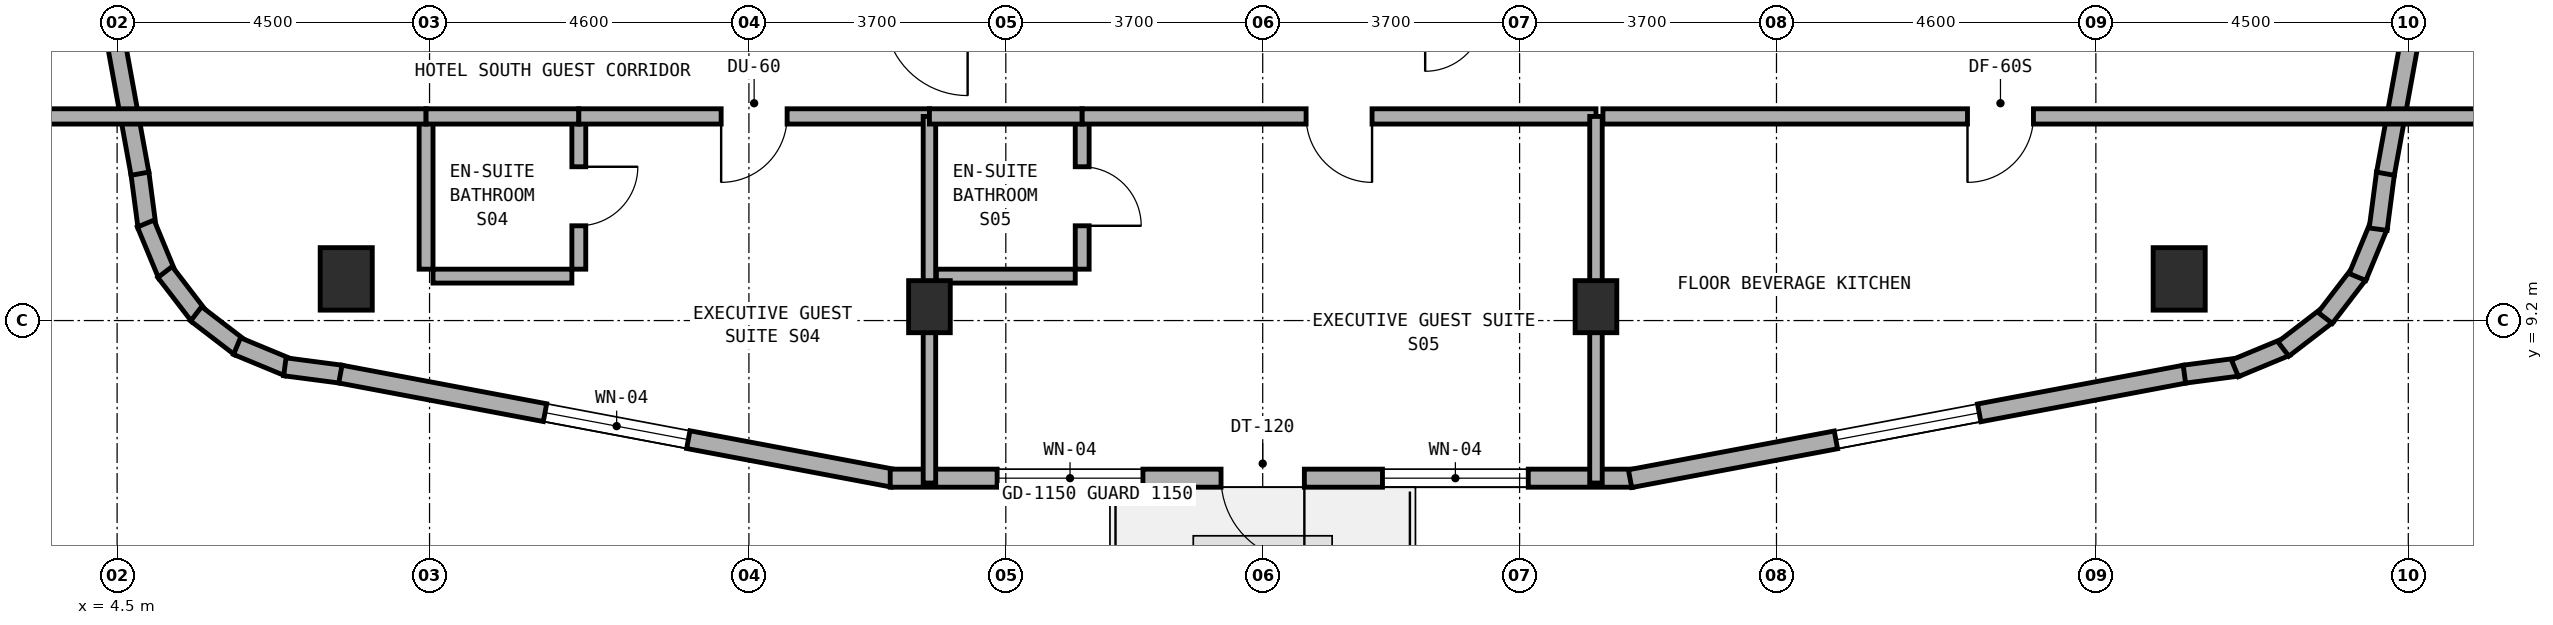
"""IFC4 building model, lengths in metres.
Left out: names, types, materials, properties, quantities, classifications, styles, units other than length and angle.
Written with IfcOpenShell. Run it as: python <this file> out.ifc"""

import sys

from ifc_helpers import new_model, si_unit, direction, frame, frame_2d, origin, origin_2d, place, context, subcontext, project, spatial, rectangle, extrude, element, fill, save


model = new_model("IFC4")
c1 = context("Model", 3, precision=1e-05, world=origin(), true_north=direction((0.0, 1.0)))
c2 = subcontext(c1, "Body", "Model", "MODEL_VIEW")
j1 = project(units=[si_unit("LENGTHUNIT", "METRE"), si_unit("PLANEANGLEUNIT", "RADIAN")], contexts=[c1])
p1 = place(None, origin())
s1 = spatial("IfcSite", under=j1, at=p1, CompositionType="ELEMENT")
p2 = place(p1, origin())
s2 = spatial("IfcBuilding", under=s1, at=p2, CompositionType="ELEMENT")
p3 = place(p2, frame((0.0, 0.0, 254.0)))
s3 = spatial("IfcBuildingStorey", under=s2, at=p3, CompositionType="ELEMENT", Elevation=254.0)
for number, where, z_axis, x_axis in (
    (1, (16.2, 9.4, 0.0), (0.0, 0.0, 1.0), (1.0, 0.0, 0.0)),
    (2, (25.8, 9.4, 0.0), (0.0, 0.0, 1.0), (1.0, 0.0, 0.0)),
):
    element("IfcColumn", number, at=place(p3, frame(where, z_axis=z_axis, x_axis=x_axis)), inside=s3, PredefinedType="COLUMN", context=c2, shape_type="SweptSolid", body=[
        extrude(rectangle(XDim=0.6, YDim=0.75, at=origin_2d()), origin(), (0.0, 0.0, 1.0), 3.6),
    ])
for number, where, z_axis, x_axis in (
    (3, (7.8, 9.8, 0.0), (0.0, 0.0, 1.0), (1.0, 0.0, 0.0)),
    (4, (34.2, 9.8, 0.0), (0.0, 0.0, 1.0), (1.0, 0.0, 0.0)),
):
    element("IfcColumn", number, at=place(p3, frame(where, z_axis=z_axis, x_axis=x_axis)), inside=s3, PredefinedType="COLUMN", context=c2, shape_type="SweptSolid", body=[
        extrude(rectangle(XDim=0.75, YDim=0.9, at=origin_2d()), origin(), (0.0, 0.0, 1.0), 3.6),
    ])
p4 = place(p3, frame((4.828, 11.325, 0.0), z_axis=(0.0, 0.0, 1.0), x_axis=(0.130729574419, -0.991418064377, 0.0)))
e5 = element("IfcWall", 5, at=p4, inside=s3, PredefinedType="STANDARD", context=c2, shape_type="SweptSolid", body=[
    extrude(rectangle(XDim=0.781, YDim=0.26, at=frame_2d((0.39, 0.0))), origin(), (0.0, 0.0, 1.0), 3.32),
])
p5 = place(p3, frame((4.912, 10.597, 0.0), z_axis=(0.0, 0.0, 1.0), x_axis=(0.382900540965, -0.923789573295, 0.0)))
e6 = element("IfcWall", 6, at=p5, inside=s3, PredefinedType="STANDARD", context=c2, shape_type="SweptSolid", body=[
    extrude(rectangle(XDim=0.799, YDim=0.26, at=frame_2d((0.399, 0.0))), origin(), (0.0, 0.0, 1.0), 3.32),
])
p6 = place(p3, frame((5.19, 9.899, 0.0), z_axis=(0.0, 0.0, 1.0), x_axis=(0.60916352983, -0.793044635519, 0.0)))
e7 = element("IfcWall", 7, at=p6, inside=s3, PredefinedType="STANDARD", context=c2, shape_type="SweptSolid", body=[
    extrude(rectangle(XDim=0.798, YDim=0.26, at=frame_2d((0.399, 0.0))), origin(), (0.0, 0.0, 1.0), 3.32),
])
p7 = place(p3, frame((5.638, 9.297, 0.0), z_axis=(0.0, 0.0, 1.0), x_axis=(0.793158129381, -0.609015748398, 0.0)))
e8 = element("IfcWall", 8, at=p7, inside=s3, PredefinedType="STANDARD", context=c2, shape_type="SweptSolid", body=[
    extrude(rectangle(XDim=0.798, YDim=0.26, at=frame_2d((0.399, 0.0))), origin(), (0.0, 0.0, 1.0), 3.32),
])
p8 = place(p3, frame((6.227, 8.832, 0.0), z_axis=(0.0, 0.0, 1.0), x_axis=(0.923681457047, -0.383161279238, 0.0)))
e9 = element("IfcWall", 9, at=p8, inside=s3, PredefinedType="STANDARD", context=c2, shape_type="SweptSolid", body=[
    extrude(rectangle(XDim=0.799, YDim=0.26, at=frame_2d((0.399, 0.0))), origin(), (0.0, 0.0, 1.0), 3.32),
])
p9 = place(p3, frame((6.916, 8.534, 0.0), z_axis=(0.0, 0.0, 1.0), x_axis=(0.99153354416, -0.129850802102, 0.0)))
e10 = element("IfcWall", 10, at=p9, inside=s3, PredefinedType="STANDARD", context=c2, shape_type="SweptSolid", body=[
    extrude(rectangle(XDim=0.816, YDim=0.26, at=frame_2d((0.408, 0.0))), origin(), (0.0, 0.0, 1.0), 3.32),
])
p10 = place(p3, frame((7.716, 8.429, 0.0), z_axis=(0.0, 0.0, 1.0), x_axis=(0.982717573718, -0.185111237656, 0.0)))
e11 = element("IfcWall", 11, at=p10, inside=s3, PredefinedType="STANDARD", context=c2, shape_type="SweptSolid", body=[
    extrude(rectangle(XDim=8.098, YDim=0.26, at=frame_2d((4.049, 0.0))), origin(), (0.0, 0.0, 1.0), 3.32),
])
p11 = place(p10, frame((2.999, 0.0, 0.85)))
e12 = element("IfcOpeningElement", 12, at=p11, cuts=e11, PredefinedType="OPENING", context=c2, shape_type="SweptSolid", body=[
    extrude(rectangle(XDim=2.1, YDim=1.5, at=frame_2d((1.05, 0.75))), frame((0.0, 0.14, 0.0), z_axis=(0.0, -1.0, 0.0), x_axis=(1.0, 0.0, 0.0)), (0.0, 0.0, 1.0), 0.28),
])
p12 = place(p3, frame((15.635, 6.93, 0.0), z_axis=(0.0, 0.0, 1.0), x_axis=(1.0, 0.0, 0.0)))
e13 = element("IfcWall", 13, at=p12, inside=s3, PredefinedType="STANDARD", context=c2, shape_type="SweptSolid", body=[
    extrude(rectangle(XDim=10.695, YDim=0.26, at=frame_2d((5.348, 0.0))), origin(), (0.0, 0.0, 1.0), 3.32),
])
p13 = place(p12, frame((4.765, 0.0, 0.0)))
e14 = element("IfcOpeningElement", 14, at=p13, cuts=e13, PredefinedType="OPENING", context=c2, shape_type="SweptSolid", body=[
    extrude(rectangle(XDim=1.2, YDim=2.15, at=frame_2d((0.6, 1.075))), frame((0.0, 0.14, 0.0), z_axis=(0.0, -1.0, 0.0), x_axis=(1.0, 0.0, 0.0)), (0.0, 0.0, 1.0), 0.28),
])
p14 = place(p12, frame((1.54, 0.0, 0.85)))
e15 = element("IfcOpeningElement", 15, at=p14, cuts=e13, PredefinedType="OPENING", context=c2, shape_type="SweptSolid", body=[
    extrude(rectangle(XDim=2.1, YDim=1.5, at=frame_2d((1.05, 0.75))), frame((0.0, 0.14, 0.0), z_axis=(0.0, -1.0, 0.0), x_axis=(1.0, 0.0, 0.0)), (0.0, 0.0, 1.0), 0.28),
])
p15 = place(p12, frame((7.09, 0.0, 0.85)))
e16 = element("IfcOpeningElement", 16, at=p15, cuts=e13, PredefinedType="OPENING", context=c2, shape_type="SweptSolid", body=[
    extrude(rectangle(XDim=2.1, YDim=1.5, at=frame_2d((1.05, 0.75))), frame((0.0, 0.14, 0.0), z_axis=(0.0, -1.0, 0.0), x_axis=(1.0, 0.0, 0.0)), (0.0, 0.0, 1.0), 0.28),
])
p16 = place(p3, frame((26.291, 6.923, 0.0), z_axis=(0.0, 0.0, 1.0), x_axis=(0.982711765767, 0.185142068214, 0.0)))
e17 = element("IfcWall", 17, at=p16, inside=s3, PredefinedType="STANDARD", context=c2, shape_type="SweptSolid", body=[
    extrude(rectangle(XDim=8.134, YDim=0.26, at=frame_2d((4.067, 0.0))), origin(), (0.0, 0.0, 1.0), 3.32),
])
p17 = place(p16, frame((3.017, 0.0, 0.85)))
e18 = element("IfcOpeningElement", 18, at=p17, cuts=e17, PredefinedType="OPENING", context=c2, shape_type="SweptSolid", body=[
    extrude(rectangle(XDim=2.1, YDim=1.5, at=frame_2d((1.05, 0.75))), frame((0.0, 0.14, 0.0), z_axis=(0.0, -1.0, 0.0), x_axis=(1.0, 0.0, 0.0)), (0.0, 0.0, 1.0), 0.28),
])
p18 = place(p3, frame((34.275, 8.428, 0.0), z_axis=(0.0, 0.0, 1.0), x_axis=(0.991423406861, 0.130689052056, 0.0)))
e19 = element("IfcWall", 19, at=p18, inside=s3, PredefinedType="STANDARD", context=c2, shape_type="SweptSolid", body=[
    extrude(rectangle(XDim=0.781, YDim=0.26, at=frame_2d((0.39, 0.0))), origin(), (0.0, 0.0, 1.0), 3.32),
])
p19 = place(p3, frame((35.003, 8.512, 0.0), z_axis=(0.0, 0.0, 1.0), x_axis=(0.923681457047, 0.383161279238, 0.0)))
e20 = element("IfcWall", 20, at=p19, inside=s3, PredefinedType="STANDARD", context=c2, shape_type="SweptSolid", body=[
    extrude(rectangle(XDim=0.799, YDim=0.26, at=frame_2d((0.399, 0.0))), origin(), (0.0, 0.0, 1.0), 3.32),
])
for number, where, z_axis, x_axis in (
    (21, (35.701, 8.79, 0.0), (0.0, 0.0, 1.0), (0.793, 0.609, 0.0)),
    (22, (36.303, 9.238, 0.0), (0.0, 0.0, 1.0), (0.609, 0.793, 0.0)),
):
    element("IfcWall", number, at=place(p3, frame(where, z_axis=z_axis, x_axis=x_axis)), inside=s3, PredefinedType="STANDARD", context=c2, shape_type="SweptSolid", body=[
        extrude(rectangle(XDim=0.798, YDim=0.26, at=frame_2d((0.399, 0.0))), origin(), (0.0, 0.0, 1.0), 3.32),
    ])
p20 = place(p3, frame((36.768, 9.827, 0.0), z_axis=(0.0, 0.0, 1.0), x_axis=(0.382900540965, 0.923789573295, 0.0)))
e23 = element("IfcWall", 23, at=p20, inside=s3, PredefinedType="STANDARD", context=c2, shape_type="SweptSolid", body=[
    extrude(rectangle(XDim=0.799, YDim=0.26, at=frame_2d((0.399, 0.0))), origin(), (0.0, 0.0, 1.0), 3.32),
])
p21 = place(p3, frame((37.066, 10.516, 0.0), z_axis=(0.0, 0.0, 1.0), x_axis=(0.130183552987, 0.991489910454, 0.0)))
e24 = element("IfcWall", 24, at=p21, inside=s3, PredefinedType="STANDARD", context=c2, shape_type="SweptSolid", body=[
    extrude(rectangle(XDim=0.816, YDim=0.26, at=frame_2d((0.408, 0.0))), origin(), (0.0, 0.0, 1.0), 3.32),
])
p22 = place(p3, frame((37.171, 11.315, 0.0), z_axis=(0.0, 0.0, 1.0), x_axis=(0.179061111398, 0.983837953316, 0.0)))
e25 = element("IfcWall", 25, at=p22, inside=s3, PredefinedType="STANDARD", context=c2, shape_type="SweptSolid", body=[
    extrude(rectangle(XDim=8.438, YDim=0.26, at=frame_2d((4.219, 0.0))), origin(), (0.0, 0.0, 1.0), 3.32),
])
p23 = place(p22, frame((4.308, 0.0, 0.85)))
e26 = element("IfcOpeningElement", 26, at=p23, cuts=e25, PredefinedType="OPENING", context=c2, shape_type="SweptSolid", body=[
    extrude(rectangle(XDim=2.1, YDim=1.5, at=frame_2d((1.05, 0.75))), frame((0.0, 0.14, 0.0), z_axis=(0.0, -1.0, 0.0), x_axis=(1.0, 0.0, 0.0)), (0.0, 0.0, 1.0), 0.28),
])
p24 = place(p3, frame((3.318, 19.617, 0.0), z_axis=(0.0, 0.0, 1.0), x_axis=(0.179061111398, -0.983837953316, 0.0)))
e27 = element("IfcWall", 27, at=p24, inside=s3, PredefinedType="STANDARD", context=c2, shape_type="SweptSolid", body=[
    extrude(rectangle(XDim=8.438, YDim=0.26, at=frame_2d((4.219, 0.0))), origin(), (0.0, 0.0, 1.0), 3.32),
])
p25 = place(p24, frame((2.691, 0.0, 0.85)))
e28 = element("IfcOpeningElement", 28, at=p25, cuts=e27, PredefinedType="OPENING", context=c2, shape_type="SweptSolid", body=[
    extrude(rectangle(XDim=2.1, YDim=1.5, at=frame_2d((1.05, 0.75))), frame((0.0, 0.14, 0.0), z_axis=(0.0, -1.0, 0.0), x_axis=(1.0, 0.0, 0.0)), (0.0, 0.0, 1.0), 0.28),
])
p26 = place(p3, frame((11.15, 9.94, 0.0), z_axis=(0.0, 0.0, 1.0), x_axis=(0.0, 1.0, 0.0)))
e29 = element("IfcWall", 29, at=p26, inside=s3, PredefinedType="PLUMBINGWALL", context=c2, shape_type="SweptSolid", body=[
    extrude(rectangle(XDim=2.1, YDim=0.2, at=frame_2d((1.05, 0.0))), origin(), (0.0, 0.0, 1.0), 2.845),
])
p27 = place(p26, frame((0.625, 0.0, 0.0)))
e30 = element("IfcOpeningElement", 30, at=p27, cuts=e29, PredefinedType="OPENING", context=c2, shape_type="SweptSolid", body=[
    extrude(rectangle(XDim=0.85, YDim=2.1, at=frame_2d((0.425, 1.05))), frame((0.0, 0.11, 0.0), z_axis=(0.0, -1.0, 0.0), x_axis=(1.0, 0.0, 0.0)), (0.0, 0.0, 1.0), 0.22),
])
p28 = place(p3, frame((9.05, 9.84, 0.0), z_axis=(0.0, 0.0, 1.0), x_axis=(1.0, 0.0, 0.0)))
e31 = element("IfcWall", 31, at=p28, inside=s3, PredefinedType="PLUMBINGWALL", context=c2, shape_type="SweptSolid", body=[
    extrude(rectangle(XDim=2.0, YDim=0.2, at=frame_2d((1.0, 0.0))), origin(), (0.0, 0.0, 1.0), 3.015),
])
p29 = place(p3, frame((8.95, 9.94, 0.0), z_axis=(0.0, 0.0, 1.0), x_axis=(0.0, 1.0, 0.0)))
e32 = element("IfcWall", 32, at=p29, inside=s3, PredefinedType="PLUMBINGWALL", context=c2, shape_type="SweptSolid", body=[
    extrude(rectangle(XDim=2.1, YDim=0.2, at=frame_2d((1.05, 0.0))), origin(), (0.0, 0.0, 1.0), 2.845),
])
p30 = place(p3, frame((3.36, 12.14, 0.0), z_axis=(0.0, 0.0, 1.0), x_axis=(1.0, 0.0, 0.0)))
e33 = element("IfcWall", 33, at=p30, inside=s3, PredefinedType="SOLIDWALL", context=c2, shape_type="SweptSolid", body=[
    extrude(rectangle(XDim=5.59, YDim=0.22, at=frame_2d((2.795, 0.0))), origin(), (0.0, 0.0, 1.0), 2.745),
])
p31 = place(p3, frame((8.95, 12.14, 0.0), z_axis=(0.0, 0.0, 1.0), x_axis=(1.0, 0.0, 0.0)))
e34 = element("IfcWall", 34, at=p31, inside=s3, PredefinedType="SOLIDWALL", context=c2, shape_type="SweptSolid", body=[
    extrude(rectangle(XDim=2.2, YDim=0.22, at=frame_2d((1.1, 0.0))), origin(), (0.0, 0.0, 1.0), 3.32),
])
p32 = place(p3, frame((11.15, 12.14, 0.0), z_axis=(0.0, 0.0, 1.0), x_axis=(1.0, 0.0, 0.0)))
e35 = element("IfcWall", 35, at=p32, inside=s3, PredefinedType="SOLIDWALL", context=c2, shape_type="SweptSolid", body=[
    extrude(rectangle(XDim=5.05, YDim=0.22, at=frame_2d((2.525, 0.0))), origin(), (0.0, 0.0, 1.0), 2.745),
])
p33 = place(p32, frame((2.05, 0.0, 0.0)))
e36 = element("IfcOpeningElement", 36, at=p33, cuts=e35, PredefinedType="OPENING", context=c2, shape_type="SweptSolid", body=[
    extrude(rectangle(XDim=0.95, YDim=2.1, at=frame_2d((0.475, 1.05))), frame((0.0, 0.12, 0.0), z_axis=(0.0, -1.0, 0.0), x_axis=(1.0, 0.0, 0.0)), (0.0, 0.0, 1.0), 0.24),
])
p34 = place(p3, frame((16.2, 6.86, 0.0), z_axis=(0.0, 0.0, 1.0), x_axis=(0.0, 1.0, 0.0)))
e37 = element("IfcWall", 37, at=p34, inside=s3, PredefinedType="SOLIDWALL", context=c2, shape_type="SweptSolid", body=[
    extrude(rectangle(XDim=5.28, YDim=0.18, at=frame_2d((2.64, 0.0))), origin(), (0.0, 0.0, 1.0), 2.745),
])
p35 = place(p3, frame((18.4, 9.94, 0.0), z_axis=(0.0, 0.0, 1.0), x_axis=(0.0, 1.0, 0.0)))
e38 = element("IfcWall", 38, at=p35, inside=s3, PredefinedType="PLUMBINGWALL", context=c2, shape_type="SweptSolid", body=[
    extrude(rectangle(XDim=2.1, YDim=0.2, at=frame_2d((1.05, 0.0))), origin(), (0.0, 0.0, 1.0), 2.845),
])
p36 = place(p35, frame((0.625, 0.0, 0.0)))
e39 = element("IfcOpeningElement", 39, at=p36, cuts=e38, PredefinedType="OPENING", context=c2, shape_type="SweptSolid", body=[
    extrude(rectangle(XDim=0.85, YDim=2.1, at=frame_2d((0.425, 1.05))), frame((0.0, 0.11, 0.0), z_axis=(0.0, -1.0, 0.0), x_axis=(1.0, 0.0, 0.0)), (0.0, 0.0, 1.0), 0.22),
])
p37 = place(p3, frame((16.3, 9.84, 0.0), z_axis=(0.0, 0.0, 1.0), x_axis=(1.0, 0.0, 0.0)))
e40 = element("IfcWall", 40, at=p37, inside=s3, PredefinedType="PLUMBINGWALL", context=c2, shape_type="SweptSolid", body=[
    extrude(rectangle(XDim=2.0, YDim=0.2, at=frame_2d((1.0, 0.0))), origin(), (0.0, 0.0, 1.0), 3.32),
])
p38 = place(p3, frame((16.2, 12.14, 0.0), z_axis=(0.0, 0.0, 1.0), x_axis=(1.0, 0.0, 0.0)))
e41 = element("IfcWall", 41, at=p38, inside=s3, PredefinedType="SOLIDWALL", context=c2, shape_type="SweptSolid", body=[
    extrude(rectangle(XDim=2.2, YDim=0.22, at=frame_2d((1.1, 0.0))), origin(), (0.0, 0.0, 1.0), 2.745),
])
p39 = place(p3, frame((18.4, 12.14, 0.0), z_axis=(0.0, 0.0, 1.0), x_axis=(1.0, 0.0, 0.0)))
e42 = element("IfcWall", 42, at=p39, inside=s3, PredefinedType="SOLIDWALL", context=c2, shape_type="SweptSolid", body=[
    extrude(rectangle(XDim=7.4, YDim=0.22, at=frame_2d((3.7, 0.0))), origin(), (0.0, 0.0, 1.0), 2.745),
])
p40 = place(p39, frame((3.225, 0.0, 0.0)))
e43 = element("IfcOpeningElement", 43, at=p40, cuts=e42, PredefinedType="OPENING", context=c2, shape_type="SweptSolid", body=[
    extrude(rectangle(XDim=0.95, YDim=2.1, at=frame_2d((0.475, 1.05))), frame((0.0, 0.12, 0.0), z_axis=(0.0, -1.0, 0.0), x_axis=(1.0, 0.0, 0.0)), (0.0, 0.0, 1.0), 0.24),
])
p41 = place(p3, frame((25.8, 6.86, 0.0), z_axis=(0.0, 0.0, 1.0), x_axis=(0.0, 1.0, 0.0)))
e44 = element("IfcWall", 44, at=p41, inside=s3, PredefinedType="SOLIDWALL", context=c2, shape_type="SweptSolid", body=[
    extrude(rectangle(XDim=5.28, YDim=0.18, at=frame_2d((2.64, 0.0))), origin(), (0.0, 0.0, 1.0), 2.745),
])
p42 = place(p3, frame((25.9, 12.14, 0.0), z_axis=(0.0, 0.0, 1.0), x_axis=(1.0, 0.0, 0.0)))
e45 = element("IfcWall", 45, at=p42, inside=s3, PredefinedType="SOLIDWALL", context=c2, shape_type="SweptSolid", body=[
    extrude(rectangle(XDim=12.64, YDim=0.22, at=frame_2d((6.32, 0.0))), origin(), (0.0, 0.0, 1.0), 2.745),
])
p43 = place(p42, frame((5.251, 0.0, 0.0)))
e46 = element("IfcOpeningElement", 46, at=p43, cuts=e45, PredefinedType="OPENING", context=c2, shape_type="SweptSolid", body=[
    extrude(rectangle(XDim=0.95, YDim=2.1, at=frame_2d((0.475, 1.05))), frame((0.0, 0.12, 0.0), z_axis=(0.0, -1.0, 0.0), x_axis=(1.0, 0.0, 0.0)), (0.0, 0.0, 1.0), 0.24),
])
p44 = place(p11, origin())
e47 = element("IfcWindow", 47, at=p44, inside=s3, PartitioningType="SINGLE_PANEL", PredefinedType="WINDOW", context=c2, shape_type="SweptSolid", body=[
    extrude(rectangle(XDim=2.1, YDim=1.5, at=frame_2d((1.05, 0.75))), frame((0.0, 0.03, 0.0), z_axis=(0.0, -1.0, 0.0), x_axis=(1.0, 0.0, 0.0)), (0.0, 0.0, 1.0), 0.06),
])
fill(e12, e47)
p45 = place(p13, frame((1.2, 0.0, 0.0), z_axis=(0.0, 0.0, 1.0), x_axis=(-1.0, 0.0, 0.0)))
e48 = element("IfcDoor", 48, at=p45, inside=s3, OperationType="SINGLE_SWING_LEFT", PredefinedType="DOOR", context=c2, shape_type="SweptSolid", body=[
    extrude(rectangle(XDim=1.2, YDim=2.15, at=frame_2d((0.6, 1.075))), frame((0.0, 0.025, 0.0), z_axis=(0.0, -1.0, 0.0), x_axis=(1.0, 0.0, 0.0)), (0.0, 0.0, 1.0), 0.05),
])
fill(e14, e48)
p46 = place(p14, origin())
e49 = element("IfcWindow", 49, at=p46, inside=s3, PartitioningType="SINGLE_PANEL", PredefinedType="WINDOW", context=c2, shape_type="SweptSolid", body=[
    extrude(rectangle(XDim=2.1, YDim=1.5, at=frame_2d((1.05, 0.75))), frame((0.0, 0.03, 0.0), z_axis=(0.0, -1.0, 0.0), x_axis=(1.0, 0.0, 0.0)), (0.0, 0.0, 1.0), 0.06),
])
fill(e15, e49)
p47 = place(p15, origin())
e50 = element("IfcWindow", 50, at=p47, inside=s3, PartitioningType="SINGLE_PANEL", PredefinedType="WINDOW", context=c2, shape_type="SweptSolid", body=[
    extrude(rectangle(XDim=2.1, YDim=1.5, at=frame_2d((1.05, 0.75))), frame((0.0, 0.03, 0.0), z_axis=(0.0, -1.0, 0.0), x_axis=(1.0, 0.0, 0.0)), (0.0, 0.0, 1.0), 0.06),
])
fill(e16, e50)
p48 = place(p17, origin())
e51 = element("IfcWindow", 51, at=p48, inside=s3, PartitioningType="SINGLE_PANEL", PredefinedType="WINDOW", context=c2, shape_type="SweptSolid", body=[
    extrude(rectangle(XDim=2.1, YDim=1.5, at=frame_2d((1.05, 0.75))), frame((0.0, 0.03, 0.0), z_axis=(0.0, -1.0, 0.0), x_axis=(1.0, 0.0, 0.0)), (0.0, 0.0, 1.0), 0.06),
])
fill(e18, e51)
p49 = place(p27, frame((0.85, 0.0, 0.0), z_axis=(0.0, 0.0, 1.0), x_axis=(-1.0, 0.0, 0.0)))
e52 = element("IfcDoor", 52, at=p49, inside=s3, OperationType="SINGLE_SWING_LEFT", PredefinedType="DOOR", context=c2, shape_type="SweptSolid", body=[
    extrude(rectangle(XDim=0.85, YDim=2.1, at=frame_2d((0.425, 1.05))), frame((0.0, 0.025, 0.0), z_axis=(0.0, -1.0, 0.0), x_axis=(1.0, 0.0, 0.0)), (0.0, 0.0, 1.0), 0.05),
])
fill(e30, e52)
p50 = place(p33, frame((0.95, 0.0, 0.0), z_axis=(0.0, 0.0, 1.0), x_axis=(-1.0, 0.0, 0.0)))
e53 = element("IfcDoor", 53, at=p50, inside=s3, OperationType="SINGLE_SWING_RIGHT", PredefinedType="DOOR", context=c2, shape_type="SweptSolid", body=[
    extrude(rectangle(XDim=0.95, YDim=2.1, at=frame_2d((0.475, 1.05))), frame((0.0, 0.025, 0.0), z_axis=(0.0, -1.0, 0.0), x_axis=(1.0, 0.0, 0.0)), (0.0, 0.0, 1.0), 0.05),
])
fill(e36, e53)
p51 = place(p36, frame((0.85, 0.0, 0.0), z_axis=(0.0, 0.0, 1.0), x_axis=(-1.0, 0.0, 0.0)))
e54 = element("IfcDoor", 54, at=p51, inside=s3, OperationType="SINGLE_SWING_RIGHT", PredefinedType="DOOR", context=c2, shape_type="SweptSolid", body=[
    extrude(rectangle(XDim=0.85, YDim=2.1, at=frame_2d((0.425, 1.05))), frame((0.0, 0.025, 0.0), z_axis=(0.0, -1.0, 0.0), x_axis=(1.0, 0.0, 0.0)), (0.0, 0.0, 1.0), 0.05),
])
fill(e39, e54)
p52 = place(p40, frame((0.95, 0.0, 0.0), z_axis=(0.0, 0.0, 1.0), x_axis=(-1.0, 0.0, 0.0)))
e55 = element("IfcDoor", 55, at=p52, inside=s3, OperationType="SINGLE_SWING_LEFT", PredefinedType="DOOR", context=c2, shape_type="SweptSolid", body=[
    extrude(rectangle(XDim=0.95, YDim=2.1, at=frame_2d((0.475, 1.05))), frame((0.0, 0.025, 0.0), z_axis=(0.0, -1.0, 0.0), x_axis=(1.0, 0.0, 0.0)), (0.0, 0.0, 1.0), 0.05),
])
fill(e43, e55)
p53 = place(p43, frame((0.95, 0.0, 0.0), z_axis=(0.0, 0.0, 1.0), x_axis=(-1.0, 0.0, 0.0)))
e56 = element("IfcDoor", 56, at=p53, inside=s3, OperationType="SINGLE_SWING_RIGHT", PredefinedType="DOOR", context=c2, shape_type="SweptSolid", body=[
    extrude(rectangle(XDim=0.95, YDim=2.1, at=frame_2d((0.475, 1.05))), frame((0.0, 0.025, 0.0), z_axis=(0.0, -1.0, 0.0), x_axis=(1.0, 0.0, 0.0)), (0.0, 0.0, 1.0), 0.05),
])
fill(e46, e56)
save(model, sys.argv[1])
